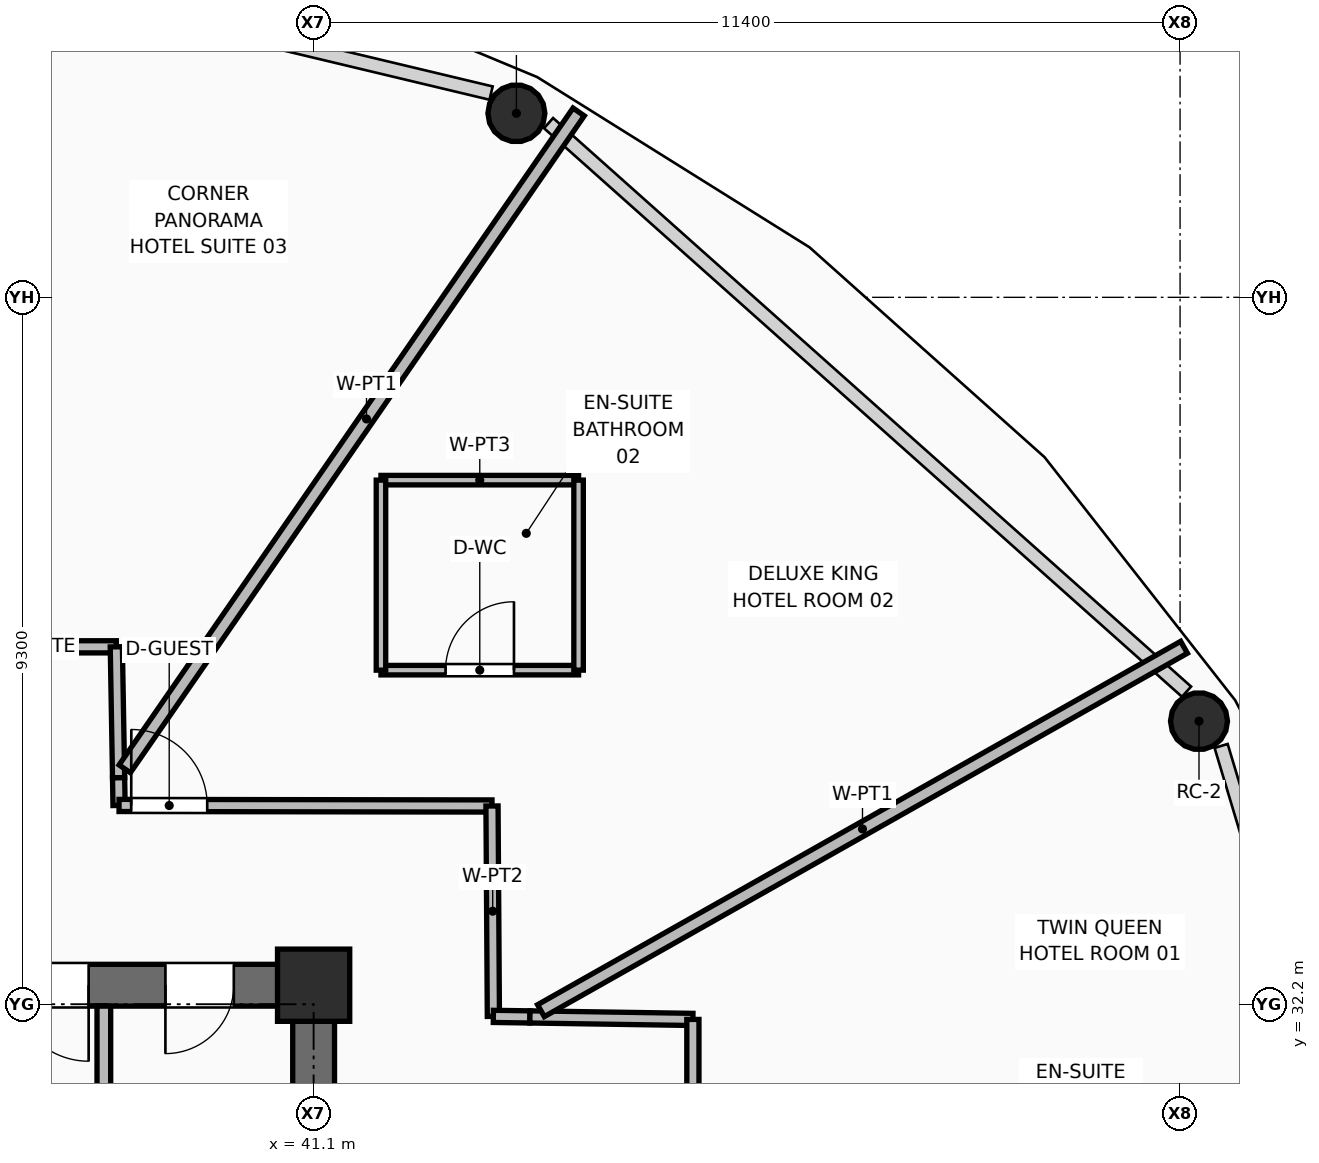
"""IFC4 building model, lengths in metres.
Left out: names, types, materials, properties, quantities, classifications, styles, units other than length and angle.
Written with IfcOpenShell. Run it as: python <this file> out.ifc"""

import sys

from ifc_helpers import new_model, si_unit, direction, frame, frame_2d, origin, origin_2d, place, context, subcontext, project, spatial, rectangle, hollow_circle, extrude, element, fill, save


model = new_model("IFC4")
c1 = context("Model", 3, precision=1e-05, world=origin(), true_north=direction((0.0, 1.0)))
c2 = subcontext(c1, "Body", "Model", "MODEL_VIEW")
j1 = project(units=[si_unit("LENGTHUNIT", "METRE"), si_unit("PLANEANGLEUNIT", "RADIAN")], contexts=[c1])
p1 = place(None, origin())
s1 = spatial("IfcSite", under=j1, at=p1, CompositionType="ELEMENT")
p2 = place(p1, origin())
s2 = spatial("IfcBuilding", under=s1, at=p2, CompositionType="ELEMENT")
p3 = place(p2, frame((0.0, 0.0, 172.2)))
s3 = spatial("IfcBuildingStorey", under=s2, at=p3, CompositionType="ELEMENT", Elevation=172.2)
p4 = place(p3, frame((41.1, 32.45, 0.0), z_axis=(0.0, 0.0, 1.0), x_axis=(1.0, 0.0, 0.0)))
e1 = element("IfcColumn", 1, at=p4, inside=s3, PredefinedType="COLUMN", context=c2, shape_type="SweptSolid", body=[
    extrude(rectangle(XDim=0.95, YDim=0.95, at=origin_2d()), origin(), (0.0, 0.0, 1.0), 3.75),
])
p5 = place(p3, frame((52.749, 35.924, 0.0), z_axis=(-0.045976334235, -0.023684778242, 0.998661708473), x_axis=(0.457956589674, -0.888974556427, 0.0)))
e2 = element("IfcColumn", 2, at=p5, inside=s3, PredefinedType="COLUMN", context=c2, shape_type="SweptSolid", body=[
    extrude(hollow_circle(Radius=0.375, WallThickness=0.035, at=origin_2d()), origin(), (0.0, 0.0, 1.0), 3.505),
])
p6 = place(p3, frame((43.768, 43.921, 0.0), z_axis=(-0.0265446917, -0.041036281919, 0.998804987427), x_axis=(0.839646641546, -0.543133056756, 0.0)))
e3 = element("IfcColumn", 3, at=p6, inside=s3, PredefinedType="COLUMN", context=c2, shape_type="SweptSolid", body=[
    extrude(hollow_circle(Radius=0.375, WallThickness=0.035, at=origin_2d()), origin(), (0.0, 0.0, 1.0), 3.504),
])
p7 = place(p3, frame((21.625, 32.45, 0.0), z_axis=(0.0, 0.0, 1.0), x_axis=(1.0, 0.0, 0.0)))
e4 = element("IfcWall", 4, at=p7, inside=s3, PredefinedType="SHEAR", context=c2, shape_type="SweptSolid", body=[
    extrude(rectangle(XDim=19.75, YDim=0.55, at=frame_2d((9.875, 0.0))), origin(), (0.0, 0.0, 1.0), 3.5),
])
p8 = place(p7, frame((2.125, 0.0, 0.0)))
e5 = element("IfcOpeningElement", 5, at=p8, cuts=e4, PredefinedType="OPENING", context=c2, shape_type="SweptSolid", body=[
    extrude(rectangle(XDim=1.1, YDim=2.1, at=frame_2d((0.55, 1.05))), frame((0.0, 0.285, 0.0), z_axis=(0.0, -1.0, 0.0), x_axis=(1.0, 0.0, 0.0)), (0.0, 0.0, 1.0), 0.57),
])
p9 = place(p7, frame((15.515, 0.0, 0.0)))
e6 = element("IfcOpeningElement", 6, at=p9, cuts=e4, PredefinedType="OPENING", context=c2, shape_type="SweptSolid", body=[
    extrude(rectangle(XDim=1.0, YDim=2.1, at=frame_2d((0.5, 1.05))), frame((0.0, 0.285, 0.0), z_axis=(0.0, -1.0, 0.0), x_axis=(1.0, 0.0, 0.0)), (0.0, 0.0, 1.0), 0.57),
])
p10 = place(p7, frame((17.525, 0.0, 0.0)))
e7 = element("IfcOpeningElement", 7, at=p10, cuts=e4, PredefinedType="OPENING", context=c2, shape_type="SweptSolid", body=[
    extrude(rectangle(XDim=0.9, YDim=2.1, at=frame_2d((0.45, 1.05))), frame((0.0, 0.285, 0.0), z_axis=(0.0, -1.0, 0.0), x_axis=(1.0, 0.0, 0.0)), (0.0, 0.0, 1.0), 0.57),
])
p11 = place(p3, frame((41.1, 18.075, 0.0), z_axis=(0.0, 0.0, 1.0), x_axis=(0.0, 1.0, 0.0)))
e8 = element("IfcWall", 8, at=p11, inside=s3, PredefinedType="SHEAR", context=c2, shape_type="SweptSolid", body=[
    extrude(rectangle(XDim=14.1, YDim=0.55, at=frame_2d((7.05, 0.0))), origin(), (0.0, 0.0, 1.0), 3.5),
])
p12 = place(p11, frame((3.385, 0.0, 0.0)))
e9 = element("IfcOpeningElement", 9, at=p12, cuts=e8, PredefinedType="OPENING", context=c2, shape_type="SweptSolid", body=[
    extrude(rectangle(XDim=1.05, YDim=2.1, at=frame_2d((0.525, 1.05))), frame((0.0, 0.285, 0.0), z_axis=(0.0, -1.0, 0.0), x_axis=(1.0, 0.0, 0.0)), (0.0, 0.0, 1.0), 0.57),
])
p13 = place(p3, frame((38.34, 28.62, 0.0), z_axis=(0.0, 0.0, 1.0), x_axis=(0.0, 1.0, 0.0)))
e10 = element("IfcWall", 10, at=p13, inside=s3, PredefinedType="PARTITIONING", context=c2, shape_type="SweptSolid", body=[
    extrude(rectangle(XDim=3.555, YDim=0.18, at=frame_2d((1.777, 0.0))), origin(), (0.0, 0.0, 1.0), 3.48),
])
p14 = place(p3, frame((32.883, 36.901, 0.0), z_axis=(0.0, 0.0, 1.0), x_axis=(0.999999976418, 0.000217174125, 0.0)))
e11 = element("IfcWall", 11, at=p14, inside=s3, PredefinedType="PARTITIONING", context=c2, shape_type="SweptSolid", body=[
    extrude(rectangle(XDim=5.621, YDim=0.16, at=frame_2d((2.811, 0.0))), origin(), (0.0, 0.0, 1.0), 3.48),
])
p15 = place(p14, frame((2.503, 0.0, 0.0)))
e12 = element("IfcOpeningElement", 12, at=p15, cuts=e11, PredefinedType="OPENING", context=c2, shape_type="SweptSolid", body=[
    extrude(rectangle(XDim=1.2, YDim=2.1, at=frame_2d((0.6, 1.05))), frame((0.0, 0.09, 0.0), z_axis=(0.0, -1.0, 0.0), x_axis=(1.0, 0.0, 0.0)), (0.0, 0.0, 1.0), 0.18),
])
p16 = place(p3, frame((38.504, 36.902, 0.0), z_axis=(0.0, 0.0, 1.0), x_axis=(0.017424387449, -0.999848183837, 0.0)))
e13 = element("IfcWall", 13, at=p16, inside=s3, PredefinedType="PARTITIONING", context=c2, shape_type="SweptSolid", body=[
    extrude(rectangle(XDim=1.723, YDim=0.16, at=frame_2d((0.862, 0.0))), origin(), (0.0, 0.0, 1.0), 3.48),
])
p17 = place(p3, frame((38.534, 35.179, 0.0), z_axis=(0.0, 0.0, 1.0), x_axis=(0.016764913799, -0.999859458957, 0.0)))
e14 = element("IfcWall", 14, at=p17, inside=s3, PredefinedType="PARTITIONING", context=c2, shape_type="SweptSolid", body=[
    extrude(rectangle(XDim=0.364, YDim=0.16, at=frame_2d((0.182, 0.0))), origin(), (0.0, 0.0, 1.0), 3.48),
])
p18 = place(p3, frame((38.54, 34.815, 0.0), z_axis=(0.0, 0.0, 1.0), x_axis=(0.999999029632, -0.001393102783, 0.0)))
e15 = element("IfcWall", 15, at=p18, inside=s3, PredefinedType="PARTITIONING", context=c2, shape_type="SweptSolid", body=[
    extrude(rectangle(XDim=4.907, YDim=0.16, at=frame_2d((2.454, 0.0))), origin(), (0.0, 0.0, 1.0), 2.936),
])
p19 = place(p18, frame((0.16, 0.0, 0.0)))
e16 = element("IfcOpeningElement", 16, at=p19, cuts=e15, PredefinedType="OPENING", context=c2, shape_type="SweptSolid", body=[
    extrude(rectangle(XDim=1.0, YDim=2.1, at=frame_2d((0.5, 1.05))), frame((0.0, 0.09, 0.0), z_axis=(0.0, -1.0, 0.0), x_axis=(1.0, 0.0, 0.0)), (0.0, 0.0, 1.0), 0.18),
])
p20 = place(p3, frame((43.447, 34.808, 0.0), z_axis=(0.0, 0.0, 1.0), x_axis=(0.006526585281, -0.999978701615, 0.0)))
e17 = element("IfcWall", 17, at=p20, inside=s3, PredefinedType="PARTITIONING", context=c2, shape_type="SweptSolid", body=[
    extrude(rectangle(XDim=2.768, YDim=0.16, at=frame_2d((1.384, 0.0))), origin(), (0.0, 0.0, 1.0), 2.936),
])
p21 = place(p3, frame((43.465, 32.04, 0.0), z_axis=(0.0, 0.0, 1.0), x_axis=(0.999891666451, -0.014719217425, 0.0)))
e18 = element("IfcWall", 18, at=p21, inside=s3, PredefinedType="PARTITIONING", context=c2, shape_type="SweptSolid", body=[
    extrude(rectangle(XDim=0.481, YDim=0.16, at=frame_2d((0.24, 0.0))), origin(), (0.0, 0.0, 1.0), 3.48),
])
p22 = place(p3, frame((43.946, 32.033, 0.0), z_axis=(0.0, 0.0, 1.0), x_axis=(0.999881866325, -0.015370536547, 0.0)))
e19 = element("IfcWall", 19, at=p22, inside=s3, PredefinedType="PARTITIONING", context=c2, shape_type="SweptSolid", body=[
    extrude(rectangle(XDim=2.144, YDim=0.16, at=frame_2d((1.072, 0.0))), origin(), (0.0, 0.0, 1.0), 3.48),
])
p23 = place(p3, frame((46.09, 32.0, 0.0), z_axis=(0.0, 0.0, 1.0), x_axis=(0.0, -1.0, 0.0)))
e20 = element("IfcWall", 20, at=p23, inside=s3, PredefinedType="PARTITIONING", context=c2, shape_type="SweptSolid", body=[
    extrude(rectangle(XDim=5.38, YDim=0.16, at=frame_2d((2.69, 0.0))), origin(), (0.0, 0.0, 1.0), 3.48),
])
p24 = place(p23, frame((1.755, 0.0, 0.0)))
e21 = element("IfcOpeningElement", 21, at=p24, cuts=e20, PredefinedType="OPENING", context=c2, shape_type="SweptSolid", body=[
    extrude(rectangle(XDim=1.0, YDim=2.1, at=frame_2d((0.5, 1.05))), frame((0.0, 0.09, 0.0), z_axis=(0.0, -1.0, 0.0), x_axis=(1.0, 0.0, 0.0)), (0.0, 0.0, 1.0), 0.18),
])
p25 = place(p3, frame((44.091, 32.115, 0.0), z_axis=(0.0, 0.0, 1.0), x_axis=(0.87061851124, 0.491958746122, 0.0)))
e22 = element("IfcWall", 22, at=p25, inside=s3, PredefinedType="PARTITIONING", context=c2, shape_type="SweptSolid", body=[
    extrude(rectangle(XDim=9.718, YDim=0.18, at=frame_2d((4.859, 0.0))), origin(), (0.0, 0.0, 1.0), 2.783),
])
p26 = place(p3, frame((38.615, 35.297, 0.0), z_axis=(0.0, 0.0, 1.0), x_axis=(0.568508810202, 0.822677174062, 0.0)))
e23 = element("IfcWall", 23, at=p26, inside=s3, PredefinedType="PARTITIONING", context=c2, shape_type="SweptSolid", body=[
    extrude(rectangle(XDim=10.505, YDim=0.18, at=frame_2d((5.252, 0.0))), origin(), (0.0, 0.0, 1.0), 2.783),
])
p27 = place(p3, frame((41.986, 36.595, 0.0), z_axis=(0.0, 0.0, 1.0), x_axis=(1.0, 0.0, 0.0)))
e24 = element("IfcWall", 24, at=p27, inside=s3, PredefinedType="PARTITIONING", context=c2, shape_type="SweptSolid", body=[
    extrude(rectangle(XDim=2.6, YDim=0.125, at=frame_2d((1.3, 0.0))), origin(), (0.0, 0.0, 1.0), 2.936),
])
p28 = place(p27, frame((0.85, 0.0, 0.0)))
e25 = element("IfcOpeningElement", 25, at=p28, cuts=e24, PredefinedType="OPENING", context=c2, shape_type="SweptSolid", body=[
    extrude(rectangle(XDim=0.9, YDim=2.1, at=frame_2d((0.45, 1.05))), frame((0.0, 0.073, 0.0), z_axis=(0.0, -1.0, 0.0), x_axis=(1.0, 0.0, 0.0)), (0.0, 0.0, 1.0), 0.145),
])
p29 = place(p3, frame((41.986, 39.095, 0.0), z_axis=(0.0, 0.0, 1.0), x_axis=(1.0, 0.0, 0.0)))
e26 = element("IfcWall", 26, at=p29, inside=s3, PredefinedType="PARTITIONING", context=c2, shape_type="SweptSolid", body=[
    extrude(rectangle(XDim=2.6, YDim=0.125, at=frame_2d((1.3, 0.0))), origin(), (0.0, 0.0, 1.0), 2.936),
])
p30 = place(p3, frame((41.986, 36.595, 0.0), z_axis=(0.0, 0.0, 1.0), x_axis=(0.0, 1.0, 0.0)))
e27 = element("IfcWall", 27, at=p30, inside=s3, PredefinedType="PARTITIONING", context=c2, shape_type="SweptSolid", body=[
    extrude(rectangle(XDim=2.5, YDim=0.125, at=frame_2d((1.25, 0.0))), origin(), (0.0, 0.0, 1.0), 2.936),
])
p31 = place(p3, frame((44.586, 36.595, 0.0), z_axis=(0.0, 0.0, 1.0), x_axis=(0.0, 1.0, 0.0)))
e28 = element("IfcWall", 28, at=p31, inside=s3, PredefinedType="PARTITIONING", context=c2, shape_type="SweptSolid", body=[
    extrude(rectangle(XDim=2.5, YDim=0.125, at=frame_2d((1.25, 0.0))), origin(), (0.0, 0.0, 1.0), 3.48),
])
p32 = place(p9, frame((1.0, 0.0, 0.0), z_axis=(0.0, 0.0, 1.0), x_axis=(-1.0, 0.0, 0.0)))
e29 = element("IfcDoor", 29, at=p32, inside=s3, OperationType="SINGLE_SWING_LEFT", PredefinedType="DOOR", context=c2, shape_type="SweptSolid", body=[
    extrude(rectangle(XDim=1.0, YDim=2.1, at=frame_2d((0.5, 1.05))), frame((0.0, 0.025, 0.0), z_axis=(0.0, -1.0, 0.0), x_axis=(1.0, 0.0, 0.0)), (0.0, 0.0, 1.0), 0.05),
])
fill(e6, e29)
p33 = place(p10, frame((0.9, 0.0, 0.0), z_axis=(0.0, 0.0, 1.0), x_axis=(-1.0, 0.0, 0.0)))
e30 = element("IfcDoor", 30, at=p33, inside=s3, OperationType="SINGLE_SWING_RIGHT", PredefinedType="DOOR", context=c2, shape_type="SweptSolid", body=[
    extrude(rectangle(XDim=0.9, YDim=2.1, at=frame_2d((0.45, 1.05))), frame((0.0, 0.025, 0.0), z_axis=(0.0, -1.0, 0.0), x_axis=(1.0, 0.0, 0.0)), (0.0, 0.0, 1.0), 0.05),
])
fill(e7, e30)
p34 = place(p28, origin())
e31 = element("IfcDoor", 31, at=p34, inside=s3, OperationType="SINGLE_SWING_RIGHT", PredefinedType="DOOR", context=c2, shape_type="SweptSolid", body=[
    extrude(rectangle(XDim=0.9, YDim=2.1, at=frame_2d((0.45, 1.05))), frame((0.0, 0.025, 0.0), z_axis=(0.0, -1.0, 0.0), x_axis=(1.0, 0.0, 0.0)), (0.0, 0.0, 1.0), 0.05),
])
fill(e25, e31)
p35 = place(p19, origin())
e32 = element("IfcDoor", 32, at=p35, inside=s3, OperationType="SINGLE_SWING_LEFT", PredefinedType="DOOR", context=c2, shape_type="SweptSolid", body=[
    extrude(rectangle(XDim=1.0, YDim=2.1, at=frame_2d((0.5, 1.05))), frame((0.0, 0.025, 0.0), z_axis=(0.0, -1.0, 0.0), x_axis=(1.0, 0.0, 0.0)), (0.0, 0.0, 1.0), 0.05),
])
fill(e16, e32)
save(model, sys.argv[1])
